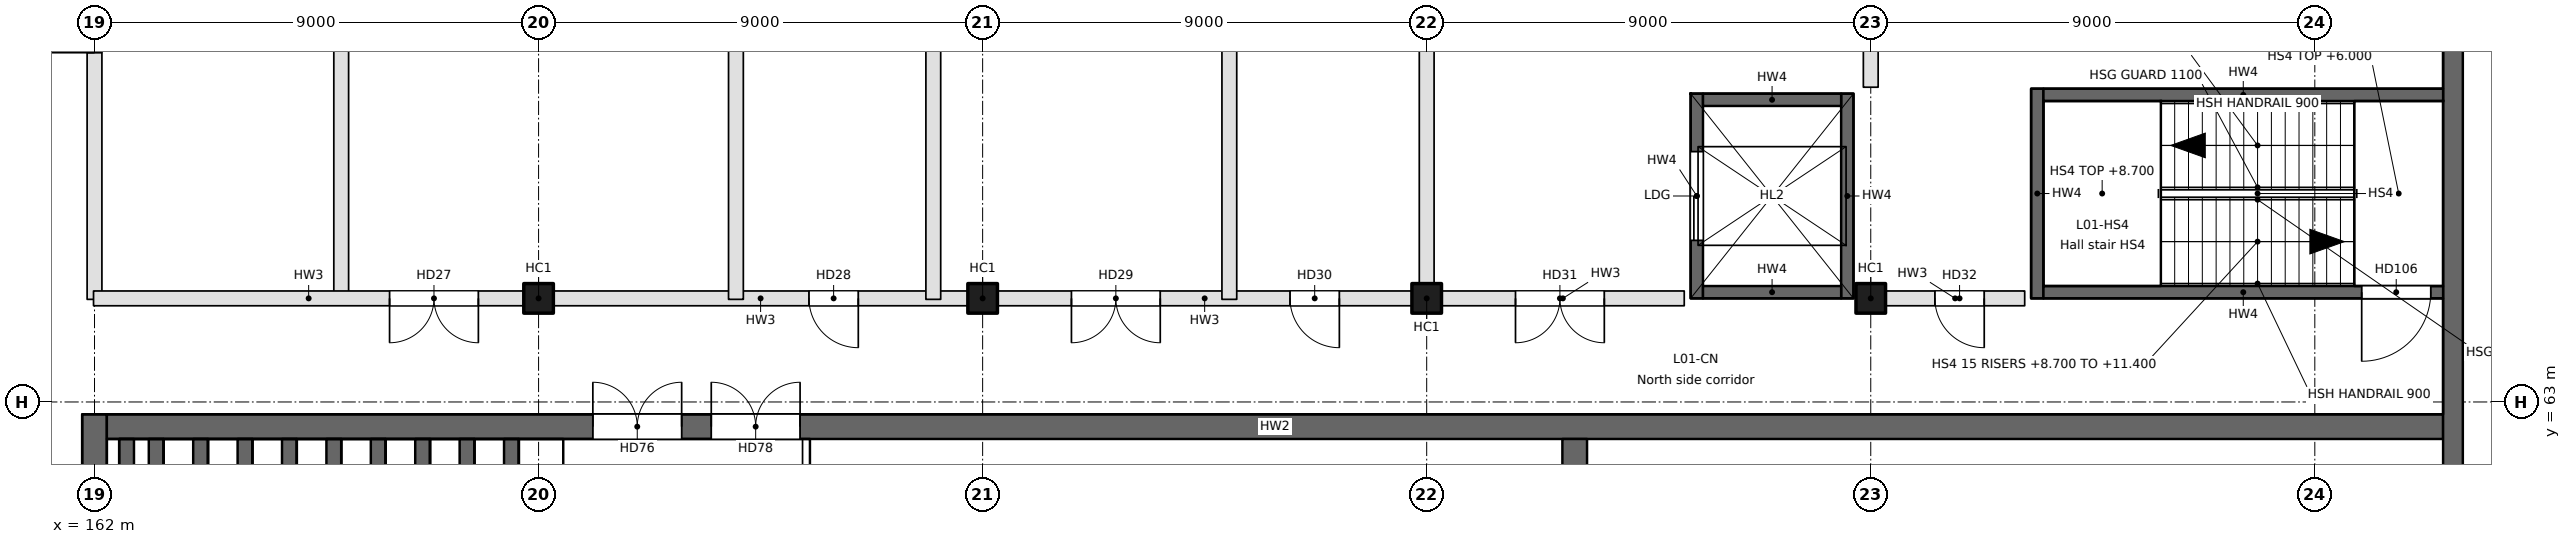
"""IFC4 building model, lengths in metres.
Left out: names, types, materials, properties, quantities, classifications, styles, units other than length and angle.
Written with IfcOpenShell. Run it as: python <this file> out.ifc"""

import sys

from ifc_helpers import new_model, si_unit, direction, frame, frame_2d, origin, origin_2d, place, context, subcontext, project, spatial, rectangle, extrude, element, fill, save


model = new_model("IFC4")
c1 = context("Model", 3, precision=1e-05, world=origin(), true_north=direction((0.0, 1.0)))
c2 = subcontext(c1, "Body", "Model", "MODEL_VIEW")
j1 = project(units=[si_unit("LENGTHUNIT", "METRE"), si_unit("PLANEANGLEUNIT", "RADIAN")], contexts=[c1])
p1 = place(None, origin())
s1 = spatial("IfcSite", under=j1, at=p1, CompositionType="ELEMENT")
p2 = place(p1, origin())
s2 = spatial("IfcBuilding", under=s1, at=p2, CompositionType="ELEMENT")
p3 = place(p2, frame((0.0, 0.0, 6.0)))
s3 = spatial("IfcBuildingStorey", under=s2, at=p3, CompositionType="ELEMENT", Elevation=6.0)
for number, where, z_axis, x_axis in (
    (1, (171.0, 65.1, 0.0), (0.0, 0.0, 1.0), (1.0, 0.0, 0.0)),
    (2, (180.0, 65.1, 0.0), (0.0, 0.0, 1.0), (1.0, 0.0, 0.0)),
    (3, (189.0, 65.1, 0.0), (0.0, 0.0, 1.0), (1.0, 0.0, 0.0)),
    (4, (198.0, 65.1, 0.0), (0.0, 0.0, 1.0), (1.0, 0.0, 0.0)),
):
    element("IfcColumn", number, at=place(p3, frame(where, z_axis=z_axis, x_axis=x_axis)), inside=s3, PredefinedType="COLUMN", context=c2, shape_type="SweptSolid", body=[
        extrude(rectangle(XDim=0.6, YDim=0.6, at=origin_2d()), origin(), (0.0, 0.0, 1.0), 5.4),
    ])
p4 = place(p3, frame((162.0, 36.25, -0.35), z_axis=(0.0, 0.0, 1.0), x_axis=(0.0, 1.0, 0.0)))
e5 = element("IfcWall", 5, at=p4, inside=s3, PredefinedType="SOLIDWALL", context=c2, shape_type="SweptSolid", body=[
    extrude(rectangle(XDim=26.5, YDim=0.5, at=frame_2d((13.25, 0.0))), origin(), (0.0, 0.0, 1.0), 5.4),
])
p5 = place(p3, frame((162.25, 62.5, -0.35), z_axis=(0.0, 0.0, 1.0), x_axis=(1.0, 0.0, 0.0)))
e6 = element("IfcWall", 6, at=p5, inside=s3, PredefinedType="SOLIDWALL", context=c2, shape_type="SweptSolid", body=[
    extrude(rectangle(XDim=47.35, YDim=0.5, at=frame_2d((23.675, 0.0))), origin(), (0.0, 0.0, 1.0), 5.4),
])
p6 = place(p5, frame((9.85, 0.0, 0.35)))
e7 = element("IfcOpeningElement", 7, at=p6, cuts=e6, PredefinedType="OPENING", context=c2, shape_type="SweptSolid", body=[
    extrude(rectangle(XDim=1.8, YDim=2.4, at=frame_2d((0.9, 1.2))), frame((0.0, 0.25, 0.0), z_axis=(0.0, -1.0, 0.0), x_axis=(1.0, 0.0, 0.0)), (0.0, 0.0, 1.0), 0.5),
])
p7 = place(p5, frame((12.25, 0.0, 0.35)))
e8 = element("IfcOpeningElement", 8, at=p7, cuts=e6, PredefinedType="OPENING", context=c2, shape_type="SweptSolid", body=[
    extrude(rectangle(XDim=1.8, YDim=2.4, at=frame_2d((0.9, 1.2))), frame((0.0, 0.25, 0.0), z_axis=(0.0, -1.0, 0.0), x_axis=(1.0, 0.0, 0.0)), (0.0, 0.0, 1.0), 0.5),
])
p8 = place(p3, frame((192.0, 56.5, -0.35), z_axis=(0.0, 0.0, 1.0), x_axis=(0.0, 1.0, 0.0)))
e9 = element("IfcWall", 9, at=p8, inside=s3, PredefinedType="SOLIDWALL", context=c2, shape_type="SweptSolid", body=[
    extrude(rectangle(XDim=5.75, YDim=0.5, at=frame_2d((2.875, 0.0))), origin(), (0.0, 0.0, 1.0), 5.4),
])
p9 = place(p3, frame((209.8, 76.5, -0.35), z_axis=(0.0, 0.0, 1.0), x_axis=(0.0, -1.0, 0.0)))
e10 = element("IfcWall", 10, at=p9, inside=s3, PredefinedType="SOLIDWALL", context=c2, shape_type="SweptSolid", body=[
    extrude(rectangle(XDim=54.0, YDim=0.4, at=frame_2d((27.0, 0.0))), origin(), (0.0, 0.0, 1.0), 5.4),
])
p10 = place(p9, frame((49.3, 0.0, 1.25)))
e11 = element("IfcOpeningElement", 11, at=p10, cuts=e10, PredefinedType="OPENING", context=c2, shape_type="SweptSolid", body=[
    extrude(rectangle(XDim=2.4, YDim=1.8, at=frame_2d((1.2, 0.9))), frame((0.0, 0.2, 0.0), z_axis=(0.0, -1.0, 0.0), x_axis=(1.0, 0.0, 0.0)), (0.0, 0.0, 1.0), 0.4),
])
p11 = place(p9, frame((2.3, 0.0, 1.25)))
e12 = element("IfcOpeningElement", 12, at=p11, cuts=e10, PredefinedType="OPENING", context=c2, shape_type="SweptSolid", body=[
    extrude(rectangle(XDim=2.4, YDim=1.8, at=frame_2d((1.2, 0.9))), frame((0.0, 0.2, 0.0), z_axis=(0.0, -1.0, 0.0), x_axis=(1.0, 0.0, 0.0)), (0.0, 0.0, 1.0), 0.4),
])
p12 = place(p3, frame((170.45, 36.75, 0.0), z_axis=(0.0, 0.0, 1.0), x_axis=(0.0, 1.0, 0.0)))
e13 = element("IfcWall", 13, at=p12, inside=s3, PredefinedType="SOLIDWALL", context=c2, shape_type="SweptSolid", body=[
    extrude(rectangle(XDim=25.5, YDim=0.3, at=frame_2d((12.75, 0.0))), origin(), (0.0, 0.0, 1.0), 0.2),
])
p13 = place(p3, frame((169.55, 36.75, 0.0), z_axis=(0.0, 0.0, 1.0), x_axis=(0.0, 1.0, 0.0)))
e14 = element("IfcWall", 14, at=p13, inside=s3, PredefinedType="SOLIDWALL", context=c2, shape_type="SweptSolid", body=[
    extrude(rectangle(XDim=25.5, YDim=0.3, at=frame_2d((12.75, 0.0))), origin(), (0.0, 0.0, 1.0), 0.4),
])
p14 = place(p3, frame((168.65, 36.75, 0.0), z_axis=(0.0, 0.0, 1.0), x_axis=(0.0, 1.0, 0.0)))
e15 = element("IfcWall", 15, at=p14, inside=s3, PredefinedType="SOLIDWALL", context=c2, shape_type="SweptSolid", body=[
    extrude(rectangle(XDim=25.5, YDim=0.3, at=frame_2d((12.75, 0.0))), origin(), (0.0, 0.0, 1.0), 0.6),
])
p15 = place(p3, frame((167.75, 36.75, 0.0), z_axis=(0.0, 0.0, 1.0), x_axis=(0.0, 1.0, 0.0)))
e16 = element("IfcWall", 16, at=p15, inside=s3, PredefinedType="SOLIDWALL", context=c2, shape_type="SweptSolid", body=[
    extrude(rectangle(XDim=25.5, YDim=0.3, at=frame_2d((12.75, 0.0))), origin(), (0.0, 0.0, 1.0), 0.8),
])
p16 = place(p3, frame((166.85, 36.75, 0.0), z_axis=(0.0, 0.0, 1.0), x_axis=(0.0, 1.0, 0.0)))
e17 = element("IfcWall", 17, at=p16, inside=s3, PredefinedType="SOLIDWALL", context=c2, shape_type="SweptSolid", body=[
    extrude(rectangle(XDim=25.5, YDim=0.3, at=frame_2d((12.75, 0.0))), origin(), (0.0, 0.0, 1.0), 1.0),
])
p17 = place(p3, frame((165.95, 36.75, 0.0), z_axis=(0.0, 0.0, 1.0), x_axis=(0.0, 1.0, 0.0)))
e18 = element("IfcWall", 18, at=p17, inside=s3, PredefinedType="SOLIDWALL", context=c2, shape_type="SweptSolid", body=[
    extrude(rectangle(XDim=25.5, YDim=0.3, at=frame_2d((12.75, 0.0))), origin(), (0.0, 0.0, 1.0), 1.2),
])
p18 = place(p3, frame((165.05, 36.75, 0.0), z_axis=(0.0, 0.0, 1.0), x_axis=(0.0, 1.0, 0.0)))
e19 = element("IfcWall", 19, at=p18, inside=s3, PredefinedType="SOLIDWALL", context=c2, shape_type="SweptSolid", body=[
    extrude(rectangle(XDim=25.5, YDim=0.3, at=frame_2d((12.75, 0.0))), origin(), (0.0, 0.0, 1.0), 1.4),
])
p19 = place(p3, frame((164.15, 36.75, 0.0), z_axis=(0.0, 0.0, 1.0), x_axis=(0.0, 1.0, 0.0)))
e20 = element("IfcWall", 20, at=p19, inside=s3, PredefinedType="SOLIDWALL", context=c2, shape_type="SweptSolid", body=[
    extrude(rectangle(XDim=25.5, YDim=0.3, at=frame_2d((12.75, 0.0))), origin(), (0.0, 0.0, 1.0), 1.6),
])
for number, where, z_axis, x_axis in (
    (21, (163.25, 36.75, 0.0), (0.0, 0.0, 1.0), (0.0, 1.0, 0.0)),
    (22, (162.65, 36.75, 0.0), (0.0, 0.0, 1.0), (0.0, 1.0, 0.0)),
):
    element("IfcWall", number, at=place(p3, frame(where, z_axis=z_axis, x_axis=x_axis)), inside=s3, PredefinedType="SOLIDWALL", context=c2, shape_type="SweptSolid", body=[
        extrude(rectangle(XDim=25.5, YDim=0.3, at=frame_2d((12.75, 0.0))), origin(), (0.0, 0.0, 1.0), 1.8),
    ])
p20 = place(p3, frame((162.0, 65.08, 0.0), z_axis=(0.0, 0.0, 1.0), x_axis=(0.0, 1.0, 0.0)))
e23 = element("IfcWall", 23, at=p20, inside=s3, PredefinedType="PARTITIONING", context=c2, shape_type="SweptSolid", body=[
    extrude(rectangle(XDim=11.19, YDim=0.3, at=frame_2d((5.595, 0.0))), origin(), (0.0, 0.0, 1.0), 5.05),
])
p21 = place(p20, frame((5.0, 0.0, 0.0)))
e24 = element("IfcOpeningElement", 24, at=p21, cuts=e23, PredefinedType="OPENING", context=c2, shape_type="SweptSolid", body=[
    extrude(rectangle(XDim=1.0, YDim=2.1, at=frame_2d((0.5, 1.05))), frame((0.0, 0.15, 0.0), z_axis=(0.0, -1.0, 0.0), x_axis=(1.0, 0.0, 0.0)), (0.0, 0.0, 1.0), 0.3),
])
p22 = place(p3, frame((198.0, 69.38, 0.0), z_axis=(0.0, 0.0, 1.0), x_axis=(0.0, 1.0, 0.0)))
e25 = element("IfcWall", 25, at=p22, inside=s3, PredefinedType="PARTITIONING", context=c2, shape_type="SweptSolid", body=[
    extrude(rectangle(XDim=6.89, YDim=0.3, at=frame_2d((3.445, 0.0))), origin(), (0.0, 0.0, 1.0), 5.05),
])
p23 = place(p3, frame((167.0, 65.08, 0.0), z_axis=(0.0, 0.0, 1.0), x_axis=(0.0, 1.0, 0.0)))
e26 = element("IfcWall", 26, at=p23, inside=s3, PredefinedType="PARTITIONING", context=c2, shape_type="SweptSolid", body=[
    extrude(rectangle(XDim=11.19, YDim=0.3, at=frame_2d((5.595, 0.0))), origin(), (0.0, 0.0, 1.0), 5.05),
])
p24 = place(p3, frame((170.7, 65.1, 0.0), z_axis=(0.0, 0.0, 1.0), x_axis=(-1.0, 0.0, 0.0)))
e27 = element("IfcWall", 27, at=p24, inside=s3, PredefinedType="PARTITIONING", context=c2, shape_type="SweptSolid", body=[
    extrude(rectangle(XDim=8.72, YDim=0.3, at=frame_2d((4.36, 0.0))), origin(), (0.0, 0.0, 1.0), 5.05),
])
p25 = place(p24, frame((0.92, 0.0, 0.0)))
e28 = element("IfcOpeningElement", 28, at=p25, cuts=e27, PredefinedType="OPENING", context=c2, shape_type="SweptSolid", body=[
    extrude(rectangle(XDim=1.8, YDim=2.1, at=frame_2d((0.9, 1.05))), frame((0.0, 0.15, 0.0), z_axis=(0.0, -1.0, 0.0), x_axis=(1.0, 0.0, 0.0)), (0.0, 0.0, 1.0), 0.3),
])
p26 = place(p3, frame((179.7, 65.1, 0.0), z_axis=(0.0, 0.0, 1.0), x_axis=(-1.0, 0.0, 0.0)))
e29 = element("IfcWall", 29, at=p26, inside=s3, PredefinedType="PARTITIONING", context=c2, shape_type="SweptSolid", body=[
    extrude(rectangle(XDim=8.4, YDim=0.3, at=frame_2d((4.2, 0.0))), origin(), (0.0, 0.0, 1.0), 5.05),
])
p27 = place(p26, frame((2.22, 0.0, 0.0)))
e30 = element("IfcOpeningElement", 30, at=p27, cuts=e29, PredefinedType="OPENING", context=c2, shape_type="SweptSolid", body=[
    extrude(rectangle(XDim=1.0, YDim=2.1, at=frame_2d((0.5, 1.05))), frame((0.0, 0.15, 0.0), z_axis=(0.0, -1.0, 0.0), x_axis=(1.0, 0.0, 0.0)), (0.0, 0.0, 1.0), 0.3),
])
p28 = place(p3, frame((188.7, 65.1, 0.0), z_axis=(0.0, 0.0, 1.0), x_axis=(-1.0, 0.0, 0.0)))
e31 = element("IfcWall", 31, at=p28, inside=s3, PredefinedType="PARTITIONING", context=c2, shape_type="SweptSolid", body=[
    extrude(rectangle(XDim=8.4, YDim=0.3, at=frame_2d((4.2, 0.0))), origin(), (0.0, 0.0, 1.0), 5.05),
])
p29 = place(p28, frame((5.1, 0.0, 0.0)))
e32 = element("IfcOpeningElement", 32, at=p29, cuts=e31, PredefinedType="OPENING", context=c2, shape_type="SweptSolid", body=[
    extrude(rectangle(XDim=1.8, YDim=2.1, at=frame_2d((0.9, 1.05))), frame((0.0, 0.15, 0.0), z_axis=(0.0, -1.0, 0.0), x_axis=(1.0, 0.0, 0.0)), (0.0, 0.0, 1.0), 0.3),
])
p30 = place(p28, frame((1.47, 0.0, 0.0)))
e33 = element("IfcOpeningElement", 33, at=p30, cuts=e31, PredefinedType="OPENING", context=c2, shape_type="SweptSolid", body=[
    extrude(rectangle(XDim=1.0, YDim=2.1, at=frame_2d((0.5, 1.05))), frame((0.0, 0.15, 0.0), z_axis=(0.0, -1.0, 0.0), x_axis=(1.0, 0.0, 0.0)), (0.0, 0.0, 1.0), 0.3),
])
p31 = place(p3, frame((194.22, 65.1, 0.0), z_axis=(0.0, 0.0, 1.0), x_axis=(-1.0, 0.0, 0.0)))
e34 = element("IfcWall", 34, at=p31, inside=s3, PredefinedType="PARTITIONING", context=c2, shape_type="SweptSolid", body=[
    extrude(rectangle(XDim=4.92, YDim=0.3, at=frame_2d((2.46, 0.0))), origin(), (0.0, 0.0, 1.0), 5.05),
])
p32 = place(p31, frame((1.62, 0.0, 0.0)))
e35 = element("IfcOpeningElement", 35, at=p32, cuts=e34, PredefinedType="OPENING", context=c2, shape_type="SweptSolid", body=[
    extrude(rectangle(XDim=1.8, YDim=2.1, at=frame_2d((0.9, 1.05))), frame((0.0, 0.15, 0.0), z_axis=(0.0, -1.0, 0.0), x_axis=(1.0, 0.0, 0.0)), (0.0, 0.0, 1.0), 0.3),
])
p33 = place(p3, frame((201.12, 65.1, 0.0), z_axis=(0.0, 0.0, 1.0), x_axis=(-1.0, 0.0, 0.0)))
e36 = element("IfcWall", 36, at=p33, inside=s3, PredefinedType="PARTITIONING", context=c2, shape_type="SweptSolid", body=[
    extrude(rectangle(XDim=2.82, YDim=0.3, at=frame_2d((1.41, 0.0))), origin(), (0.0, 0.0, 1.0), 5.05),
])
p34 = place(p33, frame((0.82, 0.0, 0.0)))
e37 = element("IfcOpeningElement", 37, at=p34, cuts=e36, PredefinedType="OPENING", context=c2, shape_type="SweptSolid", body=[
    extrude(rectangle(XDim=1.0, YDim=2.1, at=frame_2d((0.5, 1.05))), frame((0.0, 0.15, 0.0), z_axis=(0.0, -1.0, 0.0), x_axis=(1.0, 0.0, 0.0)), (0.0, 0.0, 1.0), 0.3),
])
for number, where, z_axis, x_axis in (
    (38, (175.0, 65.08, 0.0), (0.0, 0.0, 1.0), (0.0, 1.0, 0.0)),
    (39, (179.0, 65.08, 0.0), (0.0, 0.0, 1.0), (0.0, 1.0, 0.0)),
    (40, (185.0, 65.08, 0.0), (0.0, 0.0, 1.0), (0.0, 1.0, 0.0)),
):
    element("IfcWall", number, at=place(p3, frame(where, z_axis=z_axis, x_axis=x_axis)), inside=s3, PredefinedType="PARTITIONING", context=c2, shape_type="SweptSolid", body=[
        extrude(rectangle(XDim=11.19, YDim=0.3, at=frame_2d((5.595, 0.0))), origin(), (0.0, 0.0, 1.0), 5.05),
    ])
p35 = place(p3, frame((189.0, 65.4, 0.0), z_axis=(0.0, 0.0, 1.0), x_axis=(0.0, 1.0, 0.0)))
e41 = element("IfcWall", 41, at=p35, inside=s3, PredefinedType="PARTITIONING", context=c2, shape_type="SweptSolid", body=[
    extrude(rectangle(XDim=10.87, YDim=0.3, at=frame_2d((5.435, 0.0))), origin(), (0.0, 0.0, 1.0), 5.05),
])
p36 = place(p3, frame((201.375, 65.1, -0.35), z_axis=(0.0, 0.0, 1.0), x_axis=(0.0, 1.0, 0.0)))
e42 = element("IfcWall", 42, at=p36, inside=s3, PredefinedType="SOLIDWALL", context=c2, shape_type="SweptSolid", body=[
    extrude(rectangle(XDim=4.25, YDim=0.25, at=frame_2d((2.125, 0.0))), origin(), (0.0, 0.0, 1.0), 5.4),
])
p37 = place(p3, frame((209.6, 65.225, -0.35), z_axis=(0.0, 0.0, 1.0), x_axis=(-1.0, 0.0, 0.0)))
e43 = element("IfcWall", 43, at=p37, inside=s3, PredefinedType="SOLIDWALL", context=c2, shape_type="SweptSolid", body=[
    extrude(rectangle(XDim=8.1, YDim=0.25, at=frame_2d((4.05, 0.0))), origin(), (0.0, 0.0, 1.0), 5.4),
])
p38 = place(p37, frame((0.25, 0.0, 0.35)))
e44 = element("IfcOpeningElement", 44, at=p38, cuts=e43, PredefinedType="OPENING", context=c2, shape_type="SweptSolid", body=[
    extrude(rectangle(XDim=1.4, YDim=2.1, at=frame_2d((0.7, 1.05))), frame((0.0, 0.125, 0.0), z_axis=(0.0, -1.0, 0.0), x_axis=(1.0, 0.0, 0.0)), (0.0, 0.0, 1.0), 0.25),
])
p39 = place(p3, frame((201.5, 69.225, -0.35), z_axis=(0.0, 0.0, 1.0), x_axis=(1.0, 0.0, 0.0)))
e45 = element("IfcWall", 45, at=p39, inside=s3, PredefinedType="SOLIDWALL", context=c2, shape_type="SweptSolid", body=[
    extrude(rectangle(XDim=8.1, YDim=0.25, at=frame_2d((4.05, 0.0))), origin(), (0.0, 0.0, 1.0), 5.4),
])
p40 = place(p3, frame((194.475, 65.1, -0.35), z_axis=(0.0, 0.0, 1.0), x_axis=(0.0, 1.0, 0.0)))
e46 = element("IfcWall", 46, at=p40, inside=s3, PredefinedType="SOLIDWALL", context=c2, shape_type="SweptSolid", body=[
    extrude(rectangle(XDim=4.15, YDim=0.25, at=frame_2d((2.075, 0.0))), origin(), (0.0, 0.0, 1.0), 5.4),
])
p41 = place(p40, frame((1.175, 0.0, 0.35)))
e47 = element("IfcOpeningElement", 47, at=p41, cuts=e46, PredefinedType="OPENING", context=c2, shape_type="SweptSolid", body=[
    extrude(rectangle(XDim=1.8, YDim=2.4, at=frame_2d((0.9, 1.2))), frame((0.0, 0.125, 0.0), z_axis=(0.0, -1.0, 0.0), x_axis=(1.0, 0.0, 0.0)), (0.0, 0.0, 1.0), 0.25),
])
p42 = place(p3, frame((197.525, 69.25, -0.35), z_axis=(0.0, 0.0, 1.0), x_axis=(0.0, -1.0, 0.0)))
e48 = element("IfcWall", 48, at=p42, inside=s3, PredefinedType="SOLIDWALL", context=c2, shape_type="SweptSolid", body=[
    extrude(rectangle(XDim=4.15, YDim=0.25, at=frame_2d((2.075, 0.0))), origin(), (0.0, 0.0, 1.0), 5.4),
])
for number, where, z_axis, x_axis in (
    (49, (197.4, 65.225, -0.35), (0.0, 0.0, 1.0), (-1.0, 0.0, 0.0)),
    (50, (194.6, 69.125, -0.35), (0.0, 0.0, 1.0), (1.0, 0.0, 0.0)),
):
    element("IfcWall", number, at=place(p3, frame(where, z_axis=z_axis, x_axis=x_axis)), inside=s3, PredefinedType="SOLIDWALL", context=c2, shape_type="SweptSolid", body=[
        extrude(rectangle(XDim=2.8, YDim=0.25, at=frame_2d((1.4, 0.0))), origin(), (0.0, 0.0, 1.0), 5.4),
    ])
p43 = place(p21, origin())
e51 = element("IfcDoor", 51, at=p43, inside=s3, OperationType="SINGLE_SWING_LEFT", PredefinedType="DOOR", context=c2, shape_type="SweptSolid", body=[
    extrude(rectangle(XDim=1.0, YDim=2.1, at=frame_2d((0.5, 1.05))), frame((0.0, 0.025, 0.0), z_axis=(0.0, -1.0, 0.0), x_axis=(1.0, 0.0, 0.0)), (0.0, 0.0, 1.0), 0.05),
])
fill(e24, e51)
p44 = place(p25, origin())
e52 = element("IfcDoor", 52, at=p44, inside=s3, OperationType="DOUBLE_DOOR_SINGLE_SWING", PredefinedType="DOOR", context=c2, shape_type="SweptSolid", body=[
    extrude(rectangle(XDim=1.8, YDim=2.1, at=frame_2d((0.9, 1.05))), frame((0.0, 0.025, 0.0), z_axis=(0.0, -1.0, 0.0), x_axis=(1.0, 0.0, 0.0)), (0.0, 0.0, 1.0), 0.05),
])
fill(e28, e52)
p45 = place(p27, origin())
e53 = element("IfcDoor", 53, at=p45, inside=s3, OperationType="SINGLE_SWING_LEFT", PredefinedType="DOOR", context=c2, shape_type="SweptSolid", body=[
    extrude(rectangle(XDim=1.0, YDim=2.1, at=frame_2d((0.5, 1.05))), frame((0.0, 0.025, 0.0), z_axis=(0.0, -1.0, 0.0), x_axis=(1.0, 0.0, 0.0)), (0.0, 0.0, 1.0), 0.05),
])
fill(e30, e53)
p46 = place(p29, origin())
e54 = element("IfcDoor", 54, at=p46, inside=s3, OperationType="DOUBLE_DOOR_SINGLE_SWING", PredefinedType="DOOR", context=c2, shape_type="SweptSolid", body=[
    extrude(rectangle(XDim=1.8, YDim=2.1, at=frame_2d((0.9, 1.05))), frame((0.0, 0.025, 0.0), z_axis=(0.0, -1.0, 0.0), x_axis=(1.0, 0.0, 0.0)), (0.0, 0.0, 1.0), 0.05),
])
fill(e32, e54)
p47 = place(p30, origin())
e55 = element("IfcDoor", 55, at=p47, inside=s3, OperationType="SINGLE_SWING_LEFT", PredefinedType="DOOR", context=c2, shape_type="SweptSolid", body=[
    extrude(rectangle(XDim=1.0, YDim=2.1, at=frame_2d((0.5, 1.05))), frame((0.0, 0.025, 0.0), z_axis=(0.0, -1.0, 0.0), x_axis=(1.0, 0.0, 0.0)), (0.0, 0.0, 1.0), 0.05),
])
fill(e33, e55)
p48 = place(p32, origin())
e56 = element("IfcDoor", 56, at=p48, inside=s3, OperationType="DOUBLE_DOOR_SINGLE_SWING", PredefinedType="DOOR", context=c2, shape_type="SweptSolid", body=[
    extrude(rectangle(XDim=1.8, YDim=2.1, at=frame_2d((0.9, 1.05))), frame((0.0, 0.025, 0.0), z_axis=(0.0, -1.0, 0.0), x_axis=(1.0, 0.0, 0.0)), (0.0, 0.0, 1.0), 0.05),
])
fill(e35, e56)
p49 = place(p34, origin())
e57 = element("IfcDoor", 57, at=p49, inside=s3, OperationType="SINGLE_SWING_LEFT", PredefinedType="DOOR", context=c2, shape_type="SweptSolid", body=[
    extrude(rectangle(XDim=1.0, YDim=2.1, at=frame_2d((0.5, 1.05))), frame((0.0, 0.025, 0.0), z_axis=(0.0, -1.0, 0.0), x_axis=(1.0, 0.0, 0.0)), (0.0, 0.0, 1.0), 0.05),
])
fill(e37, e57)
p50 = place(p6, origin())
e58 = element("IfcDoor", 58, at=p50, inside=s3, OperationType="DOUBLE_DOOR_SINGLE_SWING", PredefinedType="DOOR", context=c2, shape_type="SweptSolid", body=[
    extrude(rectangle(XDim=1.8, YDim=2.4, at=frame_2d((0.9, 1.2))), frame((0.0, 0.025, 0.0), z_axis=(0.0, -1.0, 0.0), x_axis=(1.0, 0.0, 0.0)), (0.0, 0.0, 1.0), 0.05),
])
fill(e7, e58)
p51 = place(p7, origin())
e59 = element("IfcDoor", 59, at=p51, inside=s3, OperationType="DOUBLE_DOOR_SINGLE_SWING", PredefinedType="DOOR", context=c2, shape_type="SweptSolid", body=[
    extrude(rectangle(XDim=1.8, YDim=2.4, at=frame_2d((0.9, 1.2))), frame((0.0, 0.025, 0.0), z_axis=(0.0, -1.0, 0.0), x_axis=(1.0, 0.0, 0.0)), (0.0, 0.0, 1.0), 0.05),
])
fill(e8, e59)
p52 = place(p38, origin())
e60 = element("IfcDoor", 60, at=p52, inside=s3, OperationType="SINGLE_SWING_RIGHT", PredefinedType="DOOR", context=c2, shape_type="SweptSolid", body=[
    extrude(rectangle(XDim=1.4, YDim=2.1, at=frame_2d((0.7, 1.05))), frame((0.0, 0.025, 0.0), z_axis=(0.0, -1.0, 0.0), x_axis=(1.0, 0.0, 0.0)), (0.0, 0.0, 1.0), 0.05),
])
fill(e44, e60)
p53 = place(p41, origin())
e61 = element("IfcDoor", 61, at=p53, inside=s3, OperationType="SLIDING_TO_RIGHT", PredefinedType="DOOR", context=c2, shape_type="SweptSolid", body=[
    extrude(rectangle(XDim=1.8, YDim=2.4, at=frame_2d((0.9, 1.2))), frame((0.0, 0.025, 0.0), z_axis=(0.0, -1.0, 0.0), x_axis=(1.0, 0.0, 0.0)), (0.0, 0.0, 1.0), 0.05),
])
fill(e47, e61)
save(model, sys.argv[1])
